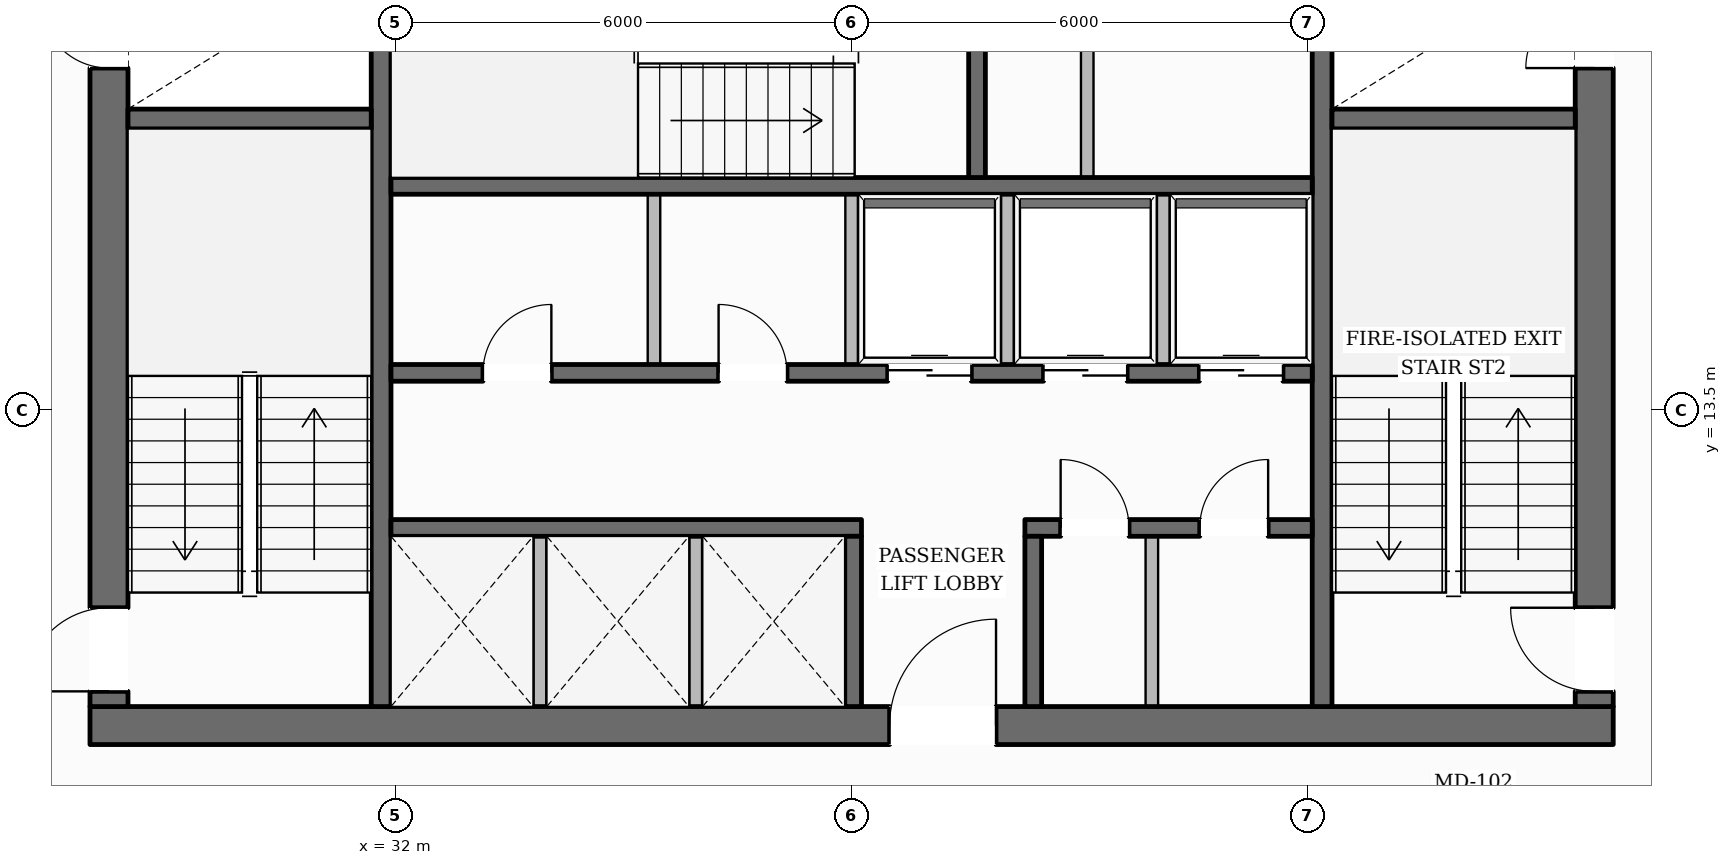
"""IFC4 building model, lengths in metres.
Left out: names, types, materials, properties, quantities, classifications, styles, units other than length and angle.
Written with IfcOpenShell. Run it as: python <this file> out.ifc"""

import sys

from ifc_helpers import new_model, si_unit, direction, frame, frame_2d, origin, place, context, subcontext, project, spatial, rectangle, extrude, element, fill, save


model = new_model("IFC4")
c1 = context("Model", 3, precision=1e-05, world=origin(), true_north=direction((0.0, 1.0)))
c2 = subcontext(c1, "Body", "Model", "MODEL_VIEW")
j1 = project(units=[si_unit("LENGTHUNIT", "METRE"), si_unit("PLANEANGLEUNIT", "RADIAN")], contexts=[c1])
p1 = place(None, origin())
s1 = spatial("IfcSite", under=j1, at=p1, CompositionType="ELEMENT")
p2 = place(p1, origin())
s2 = spatial("IfcBuilding", under=s1, at=p2, CompositionType="ELEMENT")
p3 = place(p2, frame((0.0, 0.0, 131.7)))
s3 = spatial("IfcBuildingStorey", under=s2, at=p3, CompositionType="ELEMENT", Elevation=131.7)
p4 = place(p3, frame((27.98, 9.35, 0.0), z_axis=(0.0, 0.0, 1.0), x_axis=(1.0, 0.0, 0.0)))
e1 = element("IfcWall", 1, at=p4, inside=s3, PredefinedType="SOLIDWALL", context=c2, shape_type="SweptSolid", body=[
    extrude(rectangle(XDim=20.04, YDim=0.5, at=frame_2d((10.02, 0.0))), origin(), (0.0, 0.0, 1.0), 3.6),
])
p5 = place(p4, frame((10.52, 0.0, 0.0)))
e2 = element("IfcOpeningElement", 2, at=p5, cuts=e1, PredefinedType="OPENING", context=c2, shape_type="SweptSolid", body=[
    extrude(rectangle(XDim=1.4, YDim=2.2, at=frame_2d((0.7, 1.1))), frame((0.0, 0.26, 0.0), z_axis=(0.0, -1.0, 0.0), x_axis=(1.0, 0.0, 0.0)), (0.0, 0.0, 1.0), 0.52),
])
p6 = place(p3, frame((28.23, 9.6, 0.0), z_axis=(0.0, 0.0, 1.0), x_axis=(0.0, 1.0, 0.0)))
e3 = element("IfcWall", 3, at=p6, inside=s3, PredefinedType="SOLIDWALL", context=c2, shape_type="SweptSolid", body=[
    extrude(rectangle(XDim=13.0, YDim=0.5, at=frame_2d((6.5, 0.0))), origin(), (0.0, 0.0, 1.0), 3.6),
])
p7 = place(p6, frame((0.2, 0.0, 0.0)))
e4 = element("IfcOpeningElement", 4, at=p7, cuts=e3, PredefinedType="OPENING", context=c2, shape_type="SweptSolid", body=[
    extrude(rectangle(XDim=1.1, YDim=2.15, at=frame_2d((0.55, 1.075))), frame((0.0, 0.26, 0.0), z_axis=(0.0, -1.0, 0.0), x_axis=(1.0, 0.0, 0.0)), (0.0, 0.0, 1.0), 0.52),
])
p8 = place(p6, frame((8.4, 0.0, 0.0)))
e5 = element("IfcOpeningElement", 5, at=p8, cuts=e3, PredefinedType="OPENING", context=c2, shape_type="SweptSolid", body=[
    extrude(rectangle(XDim=0.9, YDim=2.1, at=frame_2d((0.45, 1.05))), frame((0.0, 0.26, 0.0), z_axis=(0.0, -1.0, 0.0), x_axis=(1.0, 0.0, 0.0)), (0.0, 0.0, 1.0), 0.52),
])
p9 = place(p3, frame((47.77, 9.6, 0.0), z_axis=(0.0, 0.0, 1.0), x_axis=(0.0, 1.0, 0.0)))
e6 = element("IfcWall", 6, at=p9, inside=s3, PredefinedType="SOLIDWALL", context=c2, shape_type="SweptSolid", body=[
    extrude(rectangle(XDim=13.0, YDim=0.5, at=frame_2d((6.5, 0.0))), origin(), (0.0, 0.0, 1.0), 3.6),
])
p10 = place(p9, frame((0.2, 0.0, 0.0)))
e7 = element("IfcOpeningElement", 7, at=p10, cuts=e6, PredefinedType="OPENING", context=c2, shape_type="SweptSolid", body=[
    extrude(rectangle(XDim=1.1, YDim=2.15, at=frame_2d((0.55, 1.075))), frame((0.0, 0.26, 0.0), z_axis=(0.0, -1.0, 0.0), x_axis=(1.0, 0.0, 0.0)), (0.0, 0.0, 1.0), 0.52),
])
p11 = place(p9, frame((8.4, 0.0, 0.0)))
e8 = element("IfcOpeningElement", 8, at=p11, cuts=e6, PredefinedType="OPENING", context=c2, shape_type="SweptSolid", body=[
    extrude(rectangle(XDim=0.9, YDim=2.1, at=frame_2d((0.45, 1.05))), frame((0.0, 0.26, 0.0), z_axis=(0.0, -1.0, 0.0), x_axis=(1.0, 0.0, 0.0)), (0.0, 0.0, 1.0), 0.52),
])
p12 = place(p3, frame((31.81, 9.6, 0.0), z_axis=(0.0, 0.0, 1.0), x_axis=(0.0, 1.0, 0.0)))
e9 = element("IfcWall", 9, at=p12, inside=s3, PredefinedType="SHEAR", context=c2, shape_type="SweptSolid", body=[
    extrude(rectangle(XDim=13.0, YDim=0.26, at=frame_2d((6.5, 0.0))), origin(), (0.0, 0.0, 1.0), 3.6),
])
p13 = place(p12, frame((10.925, 0.0, 0.0)))
e10 = element("IfcOpeningElement", 10, at=p13, cuts=e9, PredefinedType="OPENING", context=c2, shape_type="SweptSolid", body=[
    extrude(rectangle(XDim=1.25, YDim=2.25, at=frame_2d((0.625, 1.125))), frame((0.0, 0.14, 0.0), z_axis=(0.0, -1.0, 0.0), x_axis=(1.0, 0.0, 0.0)), (0.0, 0.0, 1.0), 0.28),
])
p14 = place(p3, frame((44.19, 9.6, 0.0), z_axis=(0.0, 0.0, 1.0), x_axis=(0.0, 1.0, 0.0)))
e11 = element("IfcWall", 11, at=p14, inside=s3, PredefinedType="SHEAR", context=c2, shape_type="SweptSolid", body=[
    extrude(rectangle(XDim=13.0, YDim=0.26, at=frame_2d((6.5, 0.0))), origin(), (0.0, 0.0, 1.0), 3.6),
])
p15 = place(p14, frame((10.925, 0.0, 0.0)))
e12 = element("IfcOpeningElement", 12, at=p15, cuts=e11, PredefinedType="OPENING", context=c2, shape_type="SweptSolid", body=[
    extrude(rectangle(XDim=1.25, YDim=2.25, at=frame_2d((0.625, 1.125))), frame((0.0, 0.14, 0.0), z_axis=(0.0, -1.0, 0.0), x_axis=(1.0, 0.0, 0.0)), (0.0, 0.0, 1.0), 0.28),
])
for number, where, z_axis, x_axis in (
    (13, (28.48, 17.33, 0.0), (0.0, 0.0, 1.0), (1.0, 0.0, 0.0)),
    (14, (44.32, 17.33, 0.0), (0.0, 0.0, 1.0), (1.0, 0.0, 0.0)),
):
    element("IfcWall", number, at=place(p3, frame(where, z_axis=z_axis, x_axis=x_axis)), inside=s3, PredefinedType="SHEAR", context=c2, shape_type="SweptSolid", body=[
        extrude(rectangle(XDim=3.2, YDim=0.26, at=frame_2d((1.6, 0.0))), origin(), (0.0, 0.0, 1.0), 3.6),
    ])
p16 = place(p3, frame((31.94, 16.45, 0.0), z_axis=(0.0, 0.0, 1.0), x_axis=(1.0, 0.0, 0.0)))
e15 = element("IfcWall", 15, at=p16, inside=s3, PredefinedType="SOLIDWALL", context=c2, shape_type="SweptSolid", body=[
    extrude(rectangle(XDim=12.12, YDim=0.22, at=frame_2d((6.06, 0.0))), origin(), (0.0, 0.0, 1.0), 3.6),
])
p17 = place(p3, frame((39.65, 16.56, 0.0), z_axis=(0.0, 0.0, 1.0), x_axis=(0.0, 1.0, 0.0)))
e16 = element("IfcWall", 16, at=p17, inside=s3, PredefinedType="SOLIDWALL", context=c2, shape_type="SweptSolid", body=[
    extrude(rectangle(XDim=3.2, YDim=0.22, at=frame_2d((1.6, 0.0))), origin(), (0.0, 0.0, 1.0), 3.6),
])
p18 = place(p3, frame((31.94, 13.99, 0.0), z_axis=(0.0, 0.0, 1.0), x_axis=(1.0, 0.0, 0.0)))
e17 = element("IfcWall", 17, at=p18, inside=s3, PredefinedType="SOLIDWALL", context=c2, shape_type="SweptSolid", body=[
    extrude(rectangle(XDim=12.12, YDim=0.22, at=frame_2d((6.06, 0.0))), origin(), (0.0, 0.0, 1.0), 3.6),
])
p19 = place(p18, frame((1.21, 0.0, 0.0)))
e18 = element("IfcOpeningElement", 18, at=p19, cuts=e17, PredefinedType="OPENING", context=c2, shape_type="SweptSolid", body=[
    extrude(rectangle(XDim=0.9, YDim=2.1, at=frame_2d((0.45, 1.05))), frame((0.0, 0.12, 0.0), z_axis=(0.0, -1.0, 0.0), x_axis=(1.0, 0.0, 0.0)), (0.0, 0.0, 1.0), 0.24),
])
p20 = place(p18, frame((4.31, 0.0, 0.0)))
e19 = element("IfcOpeningElement", 19, at=p20, cuts=e17, PredefinedType="OPENING", context=c2, shape_type="SweptSolid", body=[
    extrude(rectangle(XDim=0.9, YDim=2.1, at=frame_2d((0.45, 1.05))), frame((0.0, 0.12, 0.0), z_axis=(0.0, -1.0, 0.0), x_axis=(1.0, 0.0, 0.0)), (0.0, 0.0, 1.0), 0.24),
])
p21 = place(p18, frame((6.535, 0.0, 0.0)))
e20 = element("IfcOpeningElement", 20, at=p21, cuts=e17, PredefinedType="OPENING", context=c2, shape_type="SweptSolid", body=[
    extrude(rectangle(XDim=1.1, YDim=2.2, at=frame_2d((0.55, 1.1))), frame((0.0, 0.12, 0.0), z_axis=(0.0, -1.0, 0.0), x_axis=(1.0, 0.0, 0.0)), (0.0, 0.0, 1.0), 0.24),
])
p22 = place(p18, frame((8.585, 0.0, 0.0)))
e21 = element("IfcOpeningElement", 21, at=p22, cuts=e17, PredefinedType="OPENING", context=c2, shape_type="SweptSolid", body=[
    extrude(rectangle(XDim=1.1, YDim=2.2, at=frame_2d((0.55, 1.1))), frame((0.0, 0.12, 0.0), z_axis=(0.0, -1.0, 0.0), x_axis=(1.0, 0.0, 0.0)), (0.0, 0.0, 1.0), 0.24),
])
p23 = place(p18, frame((10.635, 0.0, 0.0)))
e22 = element("IfcOpeningElement", 22, at=p23, cuts=e17, PredefinedType="OPENING", context=c2, shape_type="SweptSolid", body=[
    extrude(rectangle(XDim=1.1, YDim=2.2, at=frame_2d((0.55, 1.1))), frame((0.0, 0.12, 0.0), z_axis=(0.0, -1.0, 0.0), x_axis=(1.0, 0.0, 0.0)), (0.0, 0.0, 1.0), 0.24),
])
p24 = place(p3, frame((31.94, 11.95, 0.0), z_axis=(0.0, 0.0, 1.0), x_axis=(1.0, 0.0, 0.0)))
e23 = element("IfcWall", 23, at=p24, inside=s3, PredefinedType="SOLIDWALL", context=c2, shape_type="SweptSolid", body=[
    extrude(rectangle(XDim=6.19, YDim=0.22, at=frame_2d((3.095, 0.0))), origin(), (0.0, 0.0, 1.0), 3.6),
])
p25 = place(p3, frame((40.28, 11.95, 0.0), z_axis=(0.0, 0.0, 1.0), x_axis=(1.0, 0.0, 0.0)))
e24 = element("IfcWall", 24, at=p25, inside=s3, PredefinedType="SOLIDWALL", context=c2, shape_type="SweptSolid", body=[
    extrude(rectangle(XDim=3.78, YDim=0.22, at=frame_2d((1.89, 0.0))), origin(), (0.0, 0.0, 1.0), 3.6),
])
p26 = place(p25, frame((0.47, 0.0, 0.0)))
e25 = element("IfcOpeningElement", 25, at=p26, cuts=e24, PredefinedType="OPENING", context=c2, shape_type="SweptSolid", body=[
    extrude(rectangle(XDim=0.9, YDim=2.1, at=frame_2d((0.45, 1.05))), frame((0.0, 0.12, 0.0), z_axis=(0.0, -1.0, 0.0), x_axis=(1.0, 0.0, 0.0)), (0.0, 0.0, 1.0), 0.24),
])
p27 = place(p25, frame((2.3, 0.0, 0.0)))
e26 = element("IfcOpeningElement", 26, at=p27, cuts=e24, PredefinedType="OPENING", context=c2, shape_type="SweptSolid", body=[
    extrude(rectangle(XDim=0.9, YDim=2.1, at=frame_2d((0.45, 1.05))), frame((0.0, 0.12, 0.0), z_axis=(0.0, -1.0, 0.0), x_axis=(1.0, 0.0, 0.0)), (0.0, 0.0, 1.0), 0.24),
])
for number, where, z_axis, x_axis in (
    (27, (38.02, 9.6, 0.0), (0.0, 0.0, 1.0), (0.0, 1.0, 0.0)),
    (28, (40.39, 9.6, 0.0), (0.0, 0.0, 1.0), (0.0, 1.0, 0.0)),
):
    element("IfcWall", number, at=place(p3, frame(where, z_axis=z_axis, x_axis=x_axis)), inside=s3, PredefinedType="SOLIDWALL", context=c2, shape_type="SweptSolid", body=[
        extrude(rectangle(XDim=2.24, YDim=0.22, at=frame_2d((1.12, 0.0))), origin(), (0.0, 0.0, 1.0), 3.6),
    ])
p28 = place(p3, frame((13.485, 12.254, 0.0), z_axis=(0.0, 0.0, 1.0), x_axis=(0.505829244079, 0.862633627813, 0.0)))
e29 = element("IfcWall", 29, at=p28, inside=s3, PredefinedType="STANDARD", context=c2, shape_type="SweptSolid", body=[
    extrude(rectangle(XDim=37.223, YDim=0.38, at=frame_2d((18.611, 0.0))), origin(), (0.0, 0.0, 1.0), 3.059),
])
p29 = place(p28, frame((32.951, 0.0, 0.65)))
e30 = element("IfcOpeningElement", 30, at=p29, cuts=e29, PredefinedType="OPENING", context=c2, shape_type="SweptSolid", body=[
    extrude(rectangle(XDim=1.55, YDim=1.75, at=frame_2d((0.775, 0.875))), frame((0.0, 0.2, 0.0), z_axis=(0.0, -1.0, 0.0), x_axis=(1.0, 0.0, 0.0)), (0.0, 0.0, 1.0), 0.4),
])
p30 = place(p28, frame((26.906, 0.0, 0.65)))
e31 = element("IfcOpeningElement", 31, at=p30, cuts=e29, PredefinedType="OPENING", context=c2, shape_type="SweptSolid", body=[
    extrude(rectangle(XDim=1.55, YDim=1.75, at=frame_2d((0.775, 0.875))), frame((0.0, 0.2, 0.0), z_axis=(0.0, -1.0, 0.0), x_axis=(1.0, 0.0, 0.0)), (0.0, 0.0, 1.0), 0.4),
])
p31 = place(p28, frame((14.817, 0.0, 0.65)))
e32 = element("IfcOpeningElement", 32, at=p31, cuts=e29, PredefinedType="OPENING", context=c2, shape_type="SweptSolid", body=[
    extrude(rectangle(XDim=1.55, YDim=1.75, at=frame_2d((0.775, 0.875))), frame((0.0, 0.2, 0.0), z_axis=(0.0, -1.0, 0.0), x_axis=(1.0, 0.0, 0.0)), (0.0, 0.0, 1.0), 0.4),
])
p32 = place(p28, frame((8.773, 0.0, 0.65)))
e33 = element("IfcOpeningElement", 33, at=p32, cuts=e29, PredefinedType="OPENING", context=c2, shape_type="SweptSolid", body=[
    extrude(rectangle(XDim=1.55, YDim=1.75, at=frame_2d((0.775, 0.875))), frame((0.0, 0.2, 0.0), z_axis=(0.0, -1.0, 0.0), x_axis=(1.0, 0.0, 0.0)), (0.0, 0.0, 1.0), 0.4),
])
p33 = place(p28, frame((2.729, 0.0, 0.65)))
e34 = element("IfcOpeningElement", 34, at=p33, cuts=e29, PredefinedType="OPENING", context=c2, shape_type="SweptSolid", body=[
    extrude(rectangle(XDim=1.55, YDim=1.75, at=frame_2d((0.775, 0.875))), frame((0.0, 0.2, 0.0), z_axis=(0.0, -1.0, 0.0), x_axis=(1.0, 0.0, 0.0)), (0.0, 0.0, 1.0), 0.4),
])
p34 = place(p3, frame((43.687, 44.364, 0.0), z_axis=(0.0, 0.0, 1.0), x_axis=(0.505829244079, -0.862633627813, 0.0)))
e35 = element("IfcWall", 35, at=p34, inside=s3, PredefinedType="STANDARD", context=c2, shape_type="SweptSolid", body=[
    extrude(rectangle(XDim=37.223, YDim=0.38, at=frame_2d((18.611, 0.0))), origin(), (0.0, 0.0, 1.0), 3.059),
])
p35 = place(p34, frame((32.944, 0.0, 0.65)))
e36 = element("IfcOpeningElement", 36, at=p35, cuts=e35, PredefinedType="OPENING", context=c2, shape_type="SweptSolid", body=[
    extrude(rectangle(XDim=1.55, YDim=1.75, at=frame_2d((0.775, 0.875))), frame((0.0, 0.2, 0.0), z_axis=(0.0, -1.0, 0.0), x_axis=(1.0, 0.0, 0.0)), (0.0, 0.0, 1.0), 0.4),
])
p36 = place(p34, frame((26.9, 0.0, 0.65)))
e37 = element("IfcOpeningElement", 37, at=p36, cuts=e35, PredefinedType="OPENING", context=c2, shape_type="SweptSolid", body=[
    extrude(rectangle(XDim=1.55, YDim=1.75, at=frame_2d((0.775, 0.875))), frame((0.0, 0.2, 0.0), z_axis=(0.0, -1.0, 0.0), x_axis=(1.0, 0.0, 0.0)), (0.0, 0.0, 1.0), 0.4),
])
p37 = place(p34, frame((14.811, 0.0, 0.65)))
e38 = element("IfcOpeningElement", 38, at=p37, cuts=e35, PredefinedType="OPENING", context=c2, shape_type="SweptSolid", body=[
    extrude(rectangle(XDim=1.55, YDim=1.75, at=frame_2d((0.775, 0.875))), frame((0.0, 0.2, 0.0), z_axis=(0.0, -1.0, 0.0), x_axis=(1.0, 0.0, 0.0)), (0.0, 0.0, 1.0), 0.4),
])
p38 = place(p34, frame((8.767, 0.0, 0.65)))
e39 = element("IfcOpeningElement", 39, at=p38, cuts=e35, PredefinedType="OPENING", context=c2, shape_type="SweptSolid", body=[
    extrude(rectangle(XDim=1.55, YDim=1.75, at=frame_2d((0.775, 0.875))), frame((0.0, 0.2, 0.0), z_axis=(0.0, -1.0, 0.0), x_axis=(1.0, 0.0, 0.0)), (0.0, 0.0, 1.0), 0.4),
])
p39 = place(p34, frame((2.722, 0.0, 0.65)))
e40 = element("IfcOpeningElement", 40, at=p39, cuts=e35, PredefinedType="OPENING", context=c2, shape_type="SweptSolid", body=[
    extrude(rectangle(XDim=1.55, YDim=1.75, at=frame_2d((0.775, 0.875))), frame((0.0, 0.2, 0.0), z_axis=(0.0, -1.0, 0.0), x_axis=(1.0, 0.0, 0.0)), (0.0, 0.0, 1.0), 0.4),
])
for number, where, z_axis, x_axis in (
    (41, (33.9, 9.55, 0.0), (0.0, 0.0, 1.0), (0.0, 1.0, 0.0)),
    (42, (35.95, 9.55, 0.0), (0.0, 0.0, 1.0), (0.0, 1.0, 0.0)),
):
    element("IfcWall", number, at=place(p3, frame(where, z_axis=z_axis, x_axis=x_axis)), inside=s3, PredefinedType="PARTITIONING", context=c2, shape_type="SweptSolid", body=[
        extrude(rectangle(XDim=2.29, YDim=0.165, at=frame_2d((1.145, 0.0))), origin(), (0.0, 0.0, 1.0), 3.6),
    ])
for number, where, z_axis, x_axis in (
    (43, (38.0, 14.1, 0.0), (0.0, 0.0, 1.0), (0.0, 1.0, 0.0)),
    (44, (35.4, 14.1, 0.0), (0.0, 0.0, 1.0), (0.0, 1.0, 0.0)),
    (45, (40.05, 14.1, 0.0), (0.0, 0.0, 1.0), (0.0, 1.0, 0.0)),
    (46, (42.1, 14.1, 0.0), (0.0, 0.0, 1.0), (0.0, 1.0, 0.0)),
):
    element("IfcWall", number, at=place(p3, frame(where, z_axis=z_axis, x_axis=x_axis)), inside=s3, PredefinedType="PARTITIONING", context=c2, shape_type="SweptSolid", body=[
        extrude(rectangle(XDim=2.24, YDim=0.165, at=frame_2d((1.12, 0.0))), origin(), (0.0, 0.0, 1.0), 3.6),
    ])
p40 = place(p3, frame((41.1, 16.56, 0.0), z_axis=(0.0, 0.0, 1.0), x_axis=(0.0, 1.0, 0.0)))
e47 = element("IfcWall", 47, at=p40, inside=s3, PredefinedType="PARTITIONING", context=c2, shape_type="SweptSolid", body=[
    extrude(rectangle(XDim=3.2, YDim=0.165, at=frame_2d((1.6, 0.0))), origin(), (0.0, 0.0, 1.0), 3.6),
])
p41 = place(p3, frame((41.95, 9.55, 0.0), z_axis=(0.0, 0.0, 1.0), x_axis=(0.0, 1.0, 0.0)))
e48 = element("IfcWall", 48, at=p41, inside=s3, PredefinedType="PARTITIONING", context=c2, shape_type="SweptSolid", body=[
    extrude(rectangle(XDim=2.29, YDim=0.165, at=frame_2d((1.145, 0.0))), origin(), (0.0, 0.0, 1.0), 3.6),
])
p42 = place(p7, origin())
e49 = element("IfcDoor", 49, at=p42, inside=s3, OperationType="SINGLE_SWING_LEFT", PredefinedType="DOOR", context=c2, shape_type="SweptSolid", body=[
    extrude(rectangle(XDim=1.1, YDim=2.15, at=frame_2d((0.55, 1.075))), frame((0.0, 0.025, 0.0), z_axis=(0.0, -1.0, 0.0), x_axis=(1.0, 0.0, 0.0)), (0.0, 0.0, 1.0), 0.05),
])
fill(e4, e49)
p43 = place(p10, origin())
e50 = element("IfcDoor", 50, at=p43, inside=s3, OperationType="SINGLE_SWING_RIGHT", PredefinedType="DOOR", context=c2, shape_type="SweptSolid", body=[
    extrude(rectangle(XDim=1.1, YDim=2.15, at=frame_2d((0.55, 1.075))), frame((0.0, 0.025, 0.0), z_axis=(0.0, -1.0, 0.0), x_axis=(1.0, 0.0, 0.0)), (0.0, 0.0, 1.0), 0.05),
])
fill(e7, e50)
p44 = place(p8, origin())
e51 = element("IfcDoor", 51, at=p44, inside=s3, OperationType="SINGLE_SWING_RIGHT", PredefinedType="DOOR", context=c2, shape_type="SweptSolid", body=[
    extrude(rectangle(XDim=0.9, YDim=2.1, at=frame_2d((0.45, 1.05))), frame((0.0, 0.025, 0.0), z_axis=(0.0, -1.0, 0.0), x_axis=(1.0, 0.0, 0.0)), (0.0, 0.0, 1.0), 0.05),
])
fill(e5, e51)
p45 = place(p11, origin())
e52 = element("IfcDoor", 52, at=p45, inside=s3, OperationType="SINGLE_SWING_LEFT", PredefinedType="DOOR", context=c2, shape_type="SweptSolid", body=[
    extrude(rectangle(XDim=0.9, YDim=2.1, at=frame_2d((0.45, 1.05))), frame((0.0, 0.025, 0.0), z_axis=(0.0, -1.0, 0.0), x_axis=(1.0, 0.0, 0.0)), (0.0, 0.0, 1.0), 0.05),
])
fill(e8, e52)
p46 = place(p5, origin())
e53 = element("IfcDoor", 53, at=p46, inside=s3, OperationType="SINGLE_SWING_RIGHT", PredefinedType="DOOR", context=c2, shape_type="SweptSolid", body=[
    extrude(rectangle(XDim=1.4, YDim=2.2, at=frame_2d((0.7, 1.1))), frame((0.0, 0.025, 0.0), z_axis=(0.0, -1.0, 0.0), x_axis=(1.0, 0.0, 0.0)), (0.0, 0.0, 1.0), 0.05),
])
fill(e2, e53)
p47 = place(p19, origin())
e54 = element("IfcDoor", 54, at=p47, inside=s3, OperationType="SINGLE_SWING_RIGHT", PredefinedType="DOOR", context=c2, shape_type="SweptSolid", body=[
    extrude(rectangle(XDim=0.9, YDim=2.1, at=frame_2d((0.45, 1.05))), frame((0.0, 0.025, 0.0), z_axis=(0.0, -1.0, 0.0), x_axis=(1.0, 0.0, 0.0)), (0.0, 0.0, 1.0), 0.05),
])
fill(e18, e54)
p48 = place(p20, origin())
e55 = element("IfcDoor", 55, at=p48, inside=s3, OperationType="SINGLE_SWING_LEFT", PredefinedType="DOOR", context=c2, shape_type="SweptSolid", body=[
    extrude(rectangle(XDim=0.9, YDim=2.1, at=frame_2d((0.45, 1.05))), frame((0.0, 0.025, 0.0), z_axis=(0.0, -1.0, 0.0), x_axis=(1.0, 0.0, 0.0)), (0.0, 0.0, 1.0), 0.05),
])
fill(e19, e55)
p49 = place(p21, origin())
e56 = element("IfcDoor", 56, at=p49, inside=s3, OperationType="DOUBLE_DOOR_SLIDING", PredefinedType="DOOR", context=c2, shape_type="SweptSolid", body=[
    extrude(rectangle(XDim=1.1, YDim=2.2, at=frame_2d((0.55, 1.1))), frame((0.0, 0.025, 0.0), z_axis=(0.0, -1.0, 0.0), x_axis=(1.0, 0.0, 0.0)), (0.0, 0.0, 1.0), 0.05),
])
fill(e20, e56)
p50 = place(p22, origin())
e57 = element("IfcDoor", 57, at=p50, inside=s3, OperationType="DOUBLE_DOOR_SLIDING", PredefinedType="DOOR", context=c2, shape_type="SweptSolid", body=[
    extrude(rectangle(XDim=1.1, YDim=2.2, at=frame_2d((0.55, 1.1))), frame((0.0, 0.025, 0.0), z_axis=(0.0, -1.0, 0.0), x_axis=(1.0, 0.0, 0.0)), (0.0, 0.0, 1.0), 0.05),
])
fill(e21, e57)
p51 = place(p23, origin())
e58 = element("IfcDoor", 58, at=p51, inside=s3, OperationType="DOUBLE_DOOR_SLIDING", PredefinedType="DOOR", context=c2, shape_type="SweptSolid", body=[
    extrude(rectangle(XDim=1.1, YDim=2.2, at=frame_2d((0.55, 1.1))), frame((0.0, 0.025, 0.0), z_axis=(0.0, -1.0, 0.0), x_axis=(1.0, 0.0, 0.0)), (0.0, 0.0, 1.0), 0.05),
])
fill(e22, e58)
p52 = place(p26, origin())
e59 = element("IfcDoor", 59, at=p52, inside=s3, OperationType="SINGLE_SWING_LEFT", PredefinedType="DOOR", context=c2, shape_type="SweptSolid", body=[
    extrude(rectangle(XDim=0.9, YDim=2.1, at=frame_2d((0.45, 1.05))), frame((0.0, 0.025, 0.0), z_axis=(0.0, -1.0, 0.0), x_axis=(1.0, 0.0, 0.0)), (0.0, 0.0, 1.0), 0.05),
])
fill(e25, e59)
p53 = place(p27, origin())
e60 = element("IfcDoor", 60, at=p53, inside=s3, OperationType="SINGLE_SWING_RIGHT", PredefinedType="DOOR", context=c2, shape_type="SweptSolid", body=[
    extrude(rectangle(XDim=0.9, YDim=2.1, at=frame_2d((0.45, 1.05))), frame((0.0, 0.025, 0.0), z_axis=(0.0, -1.0, 0.0), x_axis=(1.0, 0.0, 0.0)), (0.0, 0.0, 1.0), 0.05),
])
fill(e26, e60)
save(model, sys.argv[1])
